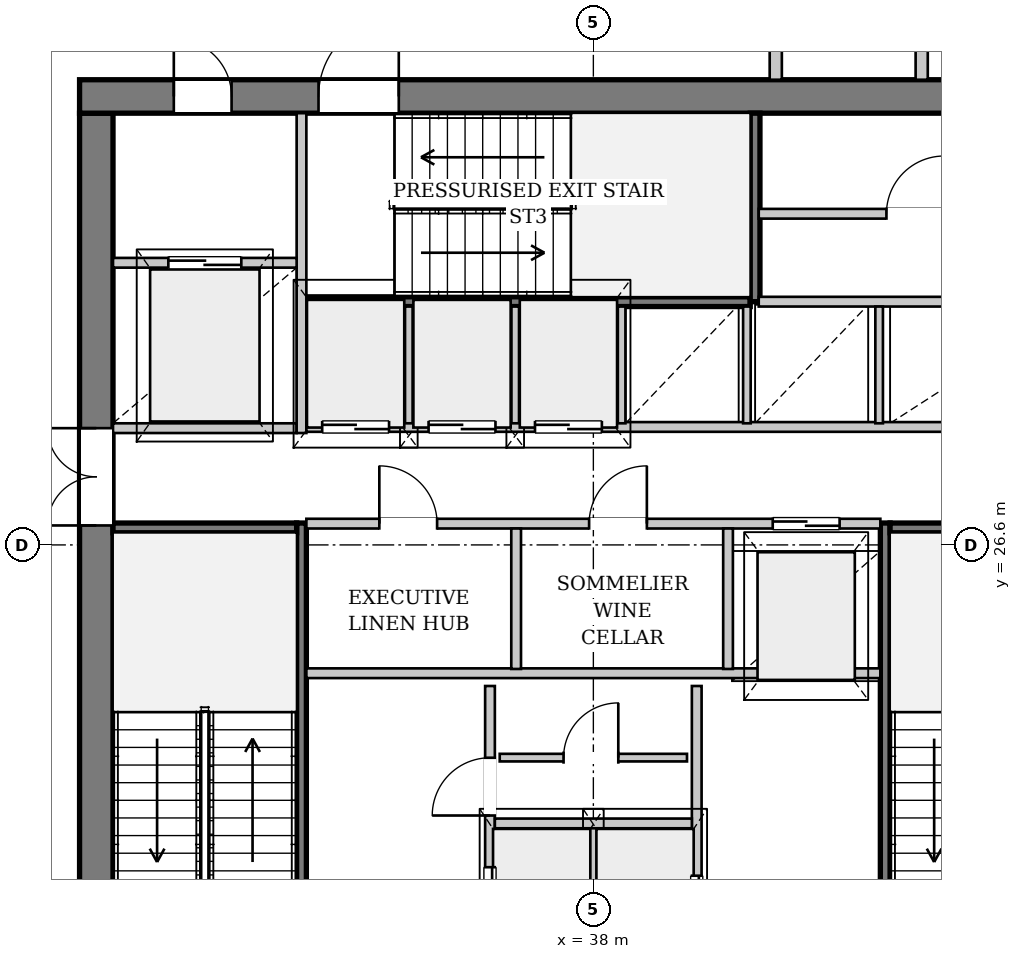
"""IFC4 building model, lengths in metres.
Left out: names, types, materials, properties, quantities, classifications, styles, units other than length and angle.
Written with IfcOpenShell. Run it as: python <this file> out.ifc"""

import sys

from ifc_helpers import new_model, si_unit, direction, frame, frame_2d, origin, place, context, subcontext, project, spatial, rectangle, extrude, source, transform, mapped, element, fill, save


model = new_model("IFC4")
c1 = context("Model", 3, precision=1e-05, world=origin(), true_north=direction((0.0, 1.0)))
c2 = subcontext(c1, "Body", "Model", "MODEL_VIEW")
j1 = project(units=[si_unit("LENGTHUNIT", "METRE"), si_unit("PLANEANGLEUNIT", "RADIAN")], contexts=[c1])
p1 = place(None, origin())
s1 = spatial("IfcSite", under=j1, at=p1, CompositionType="ELEMENT")
p2 = place(p1, origin())
s2 = spatial("IfcBuilding", under=s1, at=p2, CompositionType="ELEMENT")
p3 = place(p2, frame((0.0, 0.0, 146.6)))
s3 = spatial("IfcBuildingStorey", under=s2, at=p3, CompositionType="ELEMENT", Elevation=146.6)
p4 = place(p3, frame((29.825, 19.5, 0.0), z_axis=(0.0, 0.0, 1.0), x_axis=(0.0, 1.0, 0.0)))
e1 = element("IfcWall", 1, at=p4, inside=s3, PredefinedType="SHEAR", context=c2, shape_type="SweptSolid", body=[
    extrude(rectangle(XDim=14.2, YDim=0.55, at=frame_2d((7.1, 0.0))), origin(), (0.0, 0.0, 1.0), 3.3),
])
p5 = place(p4, frame((7.42, 0.0, 0.0)))
e2 = element("IfcOpeningElement", 2, at=p5, cuts=e1, PredefinedType="OPENING", context=c2, shape_type="SweptSolid", body=[
    extrude(rectangle(XDim=1.6, YDim=2.2, at=frame_2d((0.8, 1.1))), frame((0.0, 0.285, 0.0), z_axis=(0.0, -1.0, 0.0), x_axis=(1.0, 0.0, 0.0)), (0.0, 0.0, 1.0), 0.57),
])
p6 = place(p3, frame((29.55, 33.975, 0.0), z_axis=(0.0, 0.0, 1.0), x_axis=(1.0, 0.0, 0.0)))
e3 = element("IfcWall", 3, at=p6, inside=s3, PredefinedType="SHEAR", context=c2, shape_type="SweptSolid", body=[
    extrude(rectangle(XDim=16.9, YDim=0.55, at=frame_2d((8.45, 0.0))), origin(), (0.0, 0.0, 1.0), 3.3),
])
p7 = place(p6, frame((1.55, 0.0, 0.0)))
e4 = element("IfcOpeningElement", 4, at=p7, cuts=e3, PredefinedType="OPENING", context=c2, shape_type="SweptSolid", body=[
    extrude(rectangle(XDim=0.95, YDim=2.1, at=frame_2d((0.475, 1.05))), frame((0.0, 0.285, 0.0), z_axis=(0.0, -1.0, 0.0), x_axis=(1.0, 0.0, 0.0)), (0.0, 0.0, 1.0), 0.57),
])
p8 = place(p6, frame((3.93, 0.0, 0.0)))
e5 = element("IfcOpeningElement", 5, at=p8, cuts=e3, PredefinedType="OPENING", context=c2, shape_type="SweptSolid", body=[
    extrude(rectangle(XDim=1.32, YDim=2.2, at=frame_2d((0.66, 1.1))), frame((0.0, 0.285, 0.0), z_axis=(0.0, -1.0, 0.0), x_axis=(1.0, 0.0, 0.0)), (0.0, 0.0, 1.0), 0.57),
])
p9 = place(p3, frame((33.2, 19.5, 0.0), z_axis=(0.0, 0.0, 1.0), x_axis=(0.0, 1.0, 0.0)))
e6 = element("IfcWall", 6, at=p9, inside=s3, PredefinedType="PARTITIONING", context=c2, shape_type="SweptSolid", body=[
    extrude(rectangle(XDim=7.46, YDim=0.16, at=frame_2d((3.73, 0.0))), origin(), (0.0, 0.0, 1.0), 3.3),
])
p10 = place(p9, frame((0.08, 0.0, 0.0)))
e7 = element("IfcOpeningElement", 7, at=p10, cuts=e6, PredefinedType="OPENING", context=c2, shape_type="SweptSolid", body=[
    extrude(rectangle(XDim=1.32, YDim=2.2, at=frame_2d((0.66, 1.1))), frame((0.0, 0.09, 0.0), z_axis=(0.0, -1.0, 0.0), x_axis=(1.0, 0.0, 0.0)), (0.0, 0.0, 1.0), 0.18),
])
p11 = place(p3, frame((30.1, 26.88, 0.0), z_axis=(0.0, 0.0, 1.0), x_axis=(1.0, 0.0, 0.0)))
e8 = element("IfcWall", 8, at=p11, inside=s3, PredefinedType="PARTITIONING", context=c2, shape_type="SweptSolid", body=[
    extrude(rectangle(XDim=3.02, YDim=0.16, at=frame_2d((1.51, 0.0))), origin(), (0.0, 0.0, 1.0), 3.3),
])
p12 = place(p3, frame((42.8, 26.96, 0.0), z_axis=(0.0, 0.0, 1.0), x_axis=(0.0, -1.0, 0.0)))
e9 = element("IfcWall", 9, at=p12, inside=s3, PredefinedType="PARTITIONING", context=c2, shape_type="SweptSolid", body=[
    extrude(rectangle(XDim=7.46, YDim=0.16, at=frame_2d((3.73, 0.0))), origin(), (0.0, 0.0, 1.0), 3.3),
])
p13 = place(p12, frame((6.06, 0.0, 0.0)))
e10 = element("IfcOpeningElement", 10, at=p13, cuts=e9, PredefinedType="OPENING", context=c2, shape_type="SweptSolid", body=[
    extrude(rectangle(XDim=1.32, YDim=2.2, at=frame_2d((0.66, 1.1))), frame((0.0, 0.09, 0.0), z_axis=(0.0, -1.0, 0.0), x_axis=(1.0, 0.0, 0.0)), (0.0, 0.0, 1.0), 0.18),
])
p14 = place(p3, frame((42.88, 26.88, 0.0), z_axis=(0.0, 0.0, 1.0), x_axis=(1.0, 0.0, 0.0)))
e11 = element("IfcWall", 11, at=p14, inside=s3, PredefinedType="PARTITIONING", context=c2, shape_type="SweptSolid", body=[
    extrude(rectangle(XDim=3.02, YDim=0.16, at=frame_2d((1.51, 0.0))), origin(), (0.0, 0.0, 1.0), 3.3),
])
p15 = place(p3, frame((33.28, 30.6, 0.0), z_axis=(0.0, 0.0, 1.0), x_axis=(1.0, 0.0, 0.0)))
e12 = element("IfcWall", 12, at=p15, inside=s3, PredefinedType="PARTITIONING", context=c2, shape_type="SweptSolid", body=[
    extrude(rectangle(XDim=7.3, YDim=0.16, at=frame_2d((3.65, 0.0))), origin(), (0.0, 0.0, 1.0), 3.3),
])
p16 = place(p3, frame((40.66, 30.6, 0.0), z_axis=(0.0, 0.0, 1.0), x_axis=(0.0, 1.0, 0.0)))
e13 = element("IfcWall", 13, at=p16, inside=s3, PredefinedType="PARTITIONING", context=c2, shape_type="SweptSolid", body=[
    extrude(rectangle(XDim=3.1, YDim=0.16, at=frame_2d((1.55, 0.0))), origin(), (0.0, 0.0, 1.0), 3.3),
])
p17 = place(p3, frame((36.3, 19.5, 0.0), z_axis=(0.0, 0.0, 1.0), x_axis=(0.0, 1.0, 0.0)))
e14 = element("IfcWall", 14, at=p17, inside=s3, PredefinedType="PARTITIONING", context=c2, shape_type="SweptSolid", body=[
    extrude(rectangle(XDim=4.78, YDim=0.16, at=frame_2d((2.39, 0.0))), origin(), (0.0, 0.0, 1.0), 3.3),
])
p18 = place(p17, frame((0.6, 0.0, 0.0)))
e15 = element("IfcOpeningElement", 15, at=p18, cuts=e14, PredefinedType="OPENING", context=c2, shape_type="SweptSolid", body=[
    extrude(rectangle(XDim=1.2, YDim=2.2, at=frame_2d((0.6, 1.1))), frame((0.0, 0.09, 0.0), z_axis=(0.0, -1.0, 0.0), x_axis=(1.0, 0.0, 0.0)), (0.0, 0.0, 1.0), 0.18),
])
p19 = place(p17, frame((2.65, 0.0, 0.0)))
e16 = element("IfcOpeningElement", 16, at=p19, cuts=e14, PredefinedType="OPENING", context=c2, shape_type="SweptSolid", body=[
    extrude(rectangle(XDim=0.95, YDim=2.1, at=frame_2d((0.475, 1.05))), frame((0.0, 0.09, 0.0), z_axis=(0.0, -1.0, 0.0), x_axis=(1.0, 0.0, 0.0)), (0.0, 0.0, 1.0), 0.18),
])
p20 = place(p3, frame((39.7, 24.28, 0.0), z_axis=(0.0, 0.0, 1.0), x_axis=(0.0, -1.0, 0.0)))
e17 = element("IfcWall", 17, at=p20, inside=s3, PredefinedType="PARTITIONING", context=c2, shape_type="SweptSolid", body=[
    extrude(rectangle(XDim=4.78, YDim=0.16, at=frame_2d((2.39, 0.0))), origin(), (0.0, 0.0, 1.0), 3.3),
])
p21 = place(p20, frame((3.12, 0.0, 0.0)))
e18 = element("IfcOpeningElement", 18, at=p21, cuts=e17, PredefinedType="OPENING", context=c2, shape_type="SweptSolid", body=[
    extrude(rectangle(XDim=1.2, YDim=2.2, at=frame_2d((0.6, 1.1))), frame((0.0, 0.09, 0.0), z_axis=(0.0, -1.0, 0.0), x_axis=(1.0, 0.0, 0.0)), (0.0, 0.0, 1.0), 0.18),
])
p22 = place(p3, frame((38.0, 19.5, 0.0), z_axis=(0.0, 0.0, 1.0), x_axis=(0.0, 1.0, 0.0)))
e19 = element("IfcWall", 19, at=p22, inside=s3, PredefinedType="PARTITIONING", context=c2, shape_type="SweptSolid", body=[
    extrude(rectangle(XDim=2.46, YDim=0.125, at=frame_2d((1.23, 0.0))), origin(), (0.0, 0.0, 1.0), 3.3),
])
p23 = place(p3, frame((36.38, 22.02, 0.0), z_axis=(0.0, 0.0, 1.0), x_axis=(1.0, 0.0, 0.0)))
e20 = element("IfcWall", 20, at=p23, inside=s3, PredefinedType="PARTITIONING", context=c2, shape_type="SweptSolid", body=[
    extrude(rectangle(XDim=3.24, YDim=0.16, at=frame_2d((1.62, 0.0))), origin(), (0.0, 0.0, 1.0), 3.3),
])
p24 = place(p3, frame((33.28, 24.49, 0.0), z_axis=(0.0, 0.0, 1.0), x_axis=(1.0, 0.0, 0.0)))
e21 = element("IfcWall", 21, at=p24, inside=s3, PredefinedType="PARTITIONING", context=c2, shape_type="SweptSolid", body=[
    extrude(rectangle(XDim=9.44, YDim=0.16, at=frame_2d((4.72, 0.0))), origin(), (0.0, 0.0, 1.0), 3.3),
])
p25 = place(p3, frame((36.46, 23.102, 0.0), z_axis=(0.0, 0.0, 1.0), x_axis=(1.0, 0.0, 0.0)))
e22 = element("IfcWall", 22, at=p25, inside=s3, PredefinedType="PARTITIONING", context=c2, shape_type="SweptSolid", body=[
    extrude(rectangle(XDim=3.08, YDim=0.125, at=frame_2d((1.54, 0.0))), origin(), (0.0, 0.0, 1.0), 3.3),
])
p26 = place(p25, frame((1.05, 0.0, 0.0)))
e23 = element("IfcOpeningElement", 23, at=p26, cuts=e22, PredefinedType="OPENING", context=c2, shape_type="SweptSolid", body=[
    extrude(rectangle(XDim=0.9, YDim=2.1, at=frame_2d((0.45, 1.05))), frame((0.0, 0.073, 0.0), z_axis=(0.0, -1.0, 0.0), x_axis=(1.0, 0.0, 0.0)), (0.0, 0.0, 1.0), 0.145),
])
p27 = place(p3, frame((30.1, 28.52, 0.0), z_axis=(0.0, 0.0, 1.0), x_axis=(1.0, 0.0, 0.0)))
e24 = element("IfcWall", 24, at=p27, inside=s3, PredefinedType="PARTITIONING", context=c2, shape_type="SweptSolid", body=[
    extrude(rectangle(XDim=3.02, YDim=0.16, at=frame_2d((1.51, 0.0))), origin(), (0.0, 0.0, 1.0), 3.3),
])
p28 = place(p3, frame((33.2, 28.44, 0.0), z_axis=(0.0, 0.0, 1.0), x_axis=(0.0, 1.0, 0.0)))
e25 = element("IfcWall", 25, at=p28, inside=s3, PredefinedType="PARTITIONING", context=c2, shape_type="SweptSolid", body=[
    extrude(rectangle(XDim=5.26, YDim=0.16, at=frame_2d((2.63, 0.0))), origin(), (0.0, 0.0, 1.0), 3.3),
])
p29 = place(p3, frame((30.1, 31.24, 0.0), z_axis=(0.0, 0.0, 1.0), x_axis=(1.0, 0.0, 0.0)))
e26 = element("IfcWall", 26, at=p29, inside=s3, PredefinedType="PARTITIONING", context=c2, shape_type="SweptSolid", body=[
    extrude(rectangle(XDim=3.02, YDim=0.16, at=frame_2d((1.51, 0.0))), origin(), (0.0, 0.0, 1.0), 3.3),
])
p30 = place(p29, frame((0.91, 0.0, 0.0)))
e27 = element("IfcOpeningElement", 27, at=p30, cuts=e26, PredefinedType="OPENING", context=c2, shape_type="SweptSolid", body=[
    extrude(rectangle(XDim=1.2, YDim=2.2, at=frame_2d((0.6, 1.1))), frame((0.0, 0.09, 0.0), z_axis=(0.0, -1.0, 0.0), x_axis=(1.0, 0.0, 0.0)), (0.0, 0.0, 1.0), 0.18),
])
p31 = place(p3, frame((33.28, 26.95, 0.0), z_axis=(0.0, 0.0, 1.0), x_axis=(1.0, 0.0, 0.0)))
e28 = element("IfcWall", 28, at=p31, inside=s3, PredefinedType="PARTITIONING", context=c2, shape_type="SweptSolid", body=[
    extrude(rectangle(XDim=9.44, YDim=0.16, at=frame_2d((4.72, 0.0))), origin(), (0.0, 0.0, 1.0), 3.3),
])
p32 = place(p31, frame((1.2, 0.0, 0.0)))
e29 = element("IfcOpeningElement", 29, at=p32, cuts=e28, PredefinedType="OPENING", context=c2, shape_type="SweptSolid", body=[
    extrude(rectangle(XDim=0.95, YDim=2.1, at=frame_2d((0.475, 1.05))), frame((0.0, 0.09, 0.0), z_axis=(0.0, -1.0, 0.0), x_axis=(1.0, 0.0, 0.0)), (0.0, 0.0, 1.0), 0.18),
])
p33 = place(p31, frame((4.65, 0.0, 0.0)))
e30 = element("IfcOpeningElement", 30, at=p33, cuts=e28, PredefinedType="OPENING", context=c2, shape_type="SweptSolid", body=[
    extrude(rectangle(XDim=0.95, YDim=2.1, at=frame_2d((0.475, 1.05))), frame((0.0, 0.09, 0.0), z_axis=(0.0, -1.0, 0.0), x_axis=(1.0, 0.0, 0.0)), (0.0, 0.0, 1.0), 0.18),
])
p34 = place(p31, frame((7.67, 0.0, 0.0)))
e31 = element("IfcOpeningElement", 31, at=p34, cuts=e28, PredefinedType="OPENING", context=c2, shape_type="SweptSolid", body=[
    extrude(rectangle(XDim=1.1, YDim=2.2, at=frame_2d((0.55, 1.1))), frame((0.0, 0.09, 0.0), z_axis=(0.0, -1.0, 0.0), x_axis=(1.0, 0.0, 0.0)), (0.0, 0.0, 1.0), 0.18),
])
for number, where, z_axis, x_axis in (
    (32, (36.73, 24.56, 0.0), (0.0, 0.0, 1.0), (0.0, 1.0, 0.0)),
    (33, (40.215, 24.56, 0.0), (0.0, 0.0, 1.0), (0.0, 1.0, 0.0)),
):
    element("IfcWall", number, at=place(p3, frame(where, z_axis=z_axis, x_axis=x_axis)), inside=s3, PredefinedType="PARTITIONING", context=c2, shape_type="SweptSolid", body=[
        extrude(rectangle(XDim=2.31, YDim=0.16, at=frame_2d((1.155, 0.0))), origin(), (0.0, 0.0, 1.0), 3.3),
    ])
p35 = place(p3, frame((33.28, 28.54, 0.0), z_axis=(0.0, 0.0, 1.0), x_axis=(1.0, 0.0, 0.0)))
e34 = element("IfcWall", 34, at=p35, inside=s3, PredefinedType="PARTITIONING", context=c2, shape_type="SweptSolid", body=[
    extrude(rectangle(XDim=12.62, YDim=0.16, at=frame_2d((6.31, 0.0))), origin(), (0.0, 0.0, 1.0), 3.3),
])
p36 = place(p35, frame((0.26, 0.0, 0.0)))
e35 = element("IfcOpeningElement", 35, at=p36, cuts=e34, PredefinedType="OPENING", context=c2, shape_type="SweptSolid", body=[
    extrude(rectangle(XDim=1.1, YDim=2.2, at=frame_2d((0.55, 1.1))), frame((0.0, 0.09, 0.0), z_axis=(0.0, -1.0, 0.0), x_axis=(1.0, 0.0, 0.0)), (0.0, 0.0, 1.0), 0.18),
])
p37 = place(p35, frame((2.01, 0.0, 0.0)))
e36 = element("IfcOpeningElement", 36, at=p37, cuts=e34, PredefinedType="OPENING", context=c2, shape_type="SweptSolid", body=[
    extrude(rectangle(XDim=1.1, YDim=2.2, at=frame_2d((0.55, 1.1))), frame((0.0, 0.09, 0.0), z_axis=(0.0, -1.0, 0.0), x_axis=(1.0, 0.0, 0.0)), (0.0, 0.0, 1.0), 0.18),
])
p38 = place(p35, frame((3.76, 0.0, 0.0)))
e37 = element("IfcOpeningElement", 37, at=p38, cuts=e34, PredefinedType="OPENING", context=c2, shape_type="SweptSolid", body=[
    extrude(rectangle(XDim=1.1, YDim=2.2, at=frame_2d((0.55, 1.1))), frame((0.0, 0.09, 0.0), z_axis=(0.0, -1.0, 0.0), x_axis=(1.0, 0.0, 0.0)), (0.0, 0.0, 1.0), 0.18),
])
p39 = place(p3, frame((40.72, 30.6, 0.0), z_axis=(0.0, 0.0, 1.0), x_axis=(1.0, 0.0, 0.0)))
e38 = element("IfcWall", 38, at=p39, inside=s3, PredefinedType="PARTITIONING", context=c2, shape_type="SweptSolid", body=[
    extrude(rectangle(XDim=5.18, YDim=0.16, at=frame_2d((2.59, 0.0))), origin(), (0.0, 0.0, 1.0), 3.3),
])
for number, where, z_axis, x_axis in (
    (39, (34.965, 28.6, 0.0), (0.0, 0.0, 1.0), (0.0, 1.0, 0.0)),
    (40, (36.715, 28.6, 0.0), (0.0, 0.0, 1.0), (0.0, 1.0, 0.0)),
    (41, (38.465, 28.6, 0.0), (0.0, 0.0, 1.0), (0.0, 1.0, 0.0)),
    (42, (40.525, 28.6, 0.0), (0.0, 0.0, 1.0), (0.0, 1.0, 0.0)),
    (43, (42.7, 28.6, 0.0), (0.0, 0.0, 1.0), (0.0, 1.0, 0.0)),
):
    element("IfcWall", number, at=place(p3, frame(where, z_axis=z_axis, x_axis=x_axis)), inside=s3, PredefinedType="PARTITIONING", context=c2, shape_type="SweptSolid", body=[
        extrude(rectangle(XDim=1.92, YDim=0.125, at=frame_2d((0.96, 0.0))), origin(), (0.0, 0.0, 1.0), 3.3),
    ])
p40 = place(p3, frame((40.72, 32.046, 0.0), z_axis=(0.0, 0.0, 1.0), x_axis=(1.0, 0.0, 0.0)))
e44 = element("IfcWall", 44, at=p40, inside=s3, PredefinedType="PARTITIONING", context=c2, shape_type="SweptSolid", body=[
    extrude(rectangle(XDim=5.03, YDim=0.16, at=frame_2d((2.515, 0.0))), origin(), (0.0, 0.0, 1.0), 3.3),
])
p41 = place(p40, frame((2.1, 0.0, 0.0)))
e45 = element("IfcOpeningElement", 45, at=p41, cuts=e44, PredefinedType="OPENING", context=c2, shape_type="SweptSolid", body=[
    extrude(rectangle(XDim=0.95, YDim=2.1, at=frame_2d((0.475, 1.05))), frame((0.0, 0.09, 0.0), z_axis=(0.0, -1.0, 0.0), x_axis=(1.0, 0.0, 0.0)), (0.0, 0.0, 1.0), 0.18),
])
for number, where, z_axis, x_axis in (
    (46, (41.0, 34.25, 0.0), (0.0, 0.0, 1.0), (0.0, 1.0, 0.0)),
    (47, (43.4, 34.25, 0.0), (0.0, 0.0, 1.0), (0.0, 1.0, 0.0)),
):
    element("IfcWall", number, at=place(p3, frame(where, z_axis=z_axis, x_axis=x_axis)), inside=s3, PredefinedType="PARTITIONING", context=c2, shape_type="SweptSolid", body=[
        extrude(rectangle(XDim=1.95, YDim=0.2, at=frame_2d((0.975, 0.0))), origin(), (0.0, 0.0, 1.0), 3.3),
    ])
m1 = source(origin(), c2, "Body", "SweptSolid", [
    extrude(rectangle(XDim=1.6, YDim=2.2, at=frame_2d((0.8, 1.1))), frame((0.0, 0.025, 0.0), z_axis=(0.0, -1.0, 0.0), x_axis=(1.0, 0.0, 0.0)), (0.0, 0.0, 1.0), 0.05),
])
p42 = place(p5, origin())
e48 = element("IfcDoor", 48, at=p42, inside=s3, OperationType="DOUBLE_DOOR_SINGLE_SWING", PredefinedType="DOOR", context=c2, shape_type="MappedRepresentation", body=[
    mapped(m1, transform((0.0, 0.0, 0.0), x_axis=(1.0, 0.0, 0.0), y_axis=(0.0, 1.0, 0.0), z_axis=(0.0, 0.0, 1.0), scale=1.0)),
])
fill(e2, e48)
m2 = source(origin(), c2, "Body", "SweptSolid", [
    extrude(rectangle(XDim=0.95, YDim=2.1, at=frame_2d((0.475, 1.05))), frame((0.0, 0.025, 0.0), z_axis=(0.0, -1.0, 0.0), x_axis=(1.0, 0.0, 0.0)), (0.0, 0.0, 1.0), 0.05),
])
p43 = place(p7, origin())
e49 = element("IfcDoor", 49, at=p43, inside=s3, OperationType="SINGLE_SWING_LEFT", PredefinedType="DOOR", context=c2, shape_type="MappedRepresentation", body=[
    mapped(m2, transform((0.0, 0.0, 0.0), x_axis=(1.0, 0.0, 0.0), y_axis=(0.0, 1.0, 0.0), z_axis=(0.0, 0.0, 1.0), scale=1.0)),
])
fill(e4, e49)
m3 = source(origin(), c2, "Body", "SweptSolid", [
    extrude(rectangle(XDim=1.32, YDim=2.2, at=frame_2d((0.66, 1.1))), frame((0.0, 0.025, 0.0), z_axis=(0.0, -1.0, 0.0), x_axis=(1.0, 0.0, 0.0)), (0.0, 0.0, 1.0), 0.05),
])
p44 = place(p8, origin())
e50 = element("IfcDoor", 50, at=p44, inside=s3, OperationType="SINGLE_SWING_RIGHT", PredefinedType="DOOR", context=c2, shape_type="MappedRepresentation", body=[
    mapped(m3, transform((0.0, 0.0, 0.0), x_axis=(1.0, 0.0, 0.0), y_axis=(0.0, 1.0, 0.0), z_axis=(0.0, 0.0, 1.0), scale=1.0)),
])
fill(e5, e50)
m4 = source(origin(), c2, "Body", "SweptSolid", [
    extrude(rectangle(XDim=1.2, YDim=2.2, at=frame_2d((0.6, 1.1))), frame((0.0, 0.025, 0.0), z_axis=(0.0, -1.0, 0.0), x_axis=(1.0, 0.0, 0.0)), (0.0, 0.0, 1.0), 0.05),
])
p45 = place(p18, origin())
e51 = element("IfcDoor", 51, at=p45, inside=s3, OperationType="DOUBLE_DOOR_SLIDING", PredefinedType="DOOR", context=c2, shape_type="MappedRepresentation", body=[
    mapped(m4, transform((0.0, 0.0, 0.0), x_axis=(1.0, 0.0, 0.0), y_axis=(0.0, 1.0, 0.0), z_axis=(0.0, 0.0, 1.0), scale=1.0)),
])
fill(e15, e51)
p46 = place(p19, origin())
e52 = element("IfcDoor", 52, at=p46, inside=s3, OperationType="SINGLE_SWING_LEFT", PredefinedType="DOOR", context=c2, shape_type="MappedRepresentation", body=[
    mapped(m2, transform((0.0, 0.0, 0.0), x_axis=(1.0, 0.0, 0.0), y_axis=(0.0, 1.0, 0.0), z_axis=(0.0, 0.0, 1.0), scale=1.0)),
])
fill(e16, e52)
m5 = source(origin(), c2, "Body", "SweptSolid", [
    extrude(rectangle(XDim=0.9, YDim=2.1, at=frame_2d((0.45, 1.05))), frame((0.0, 0.025, 0.0), z_axis=(0.0, -1.0, 0.0), x_axis=(1.0, 0.0, 0.0)), (0.0, 0.0, 1.0), 0.05),
])
p47 = place(p26, origin())
e53 = element("IfcDoor", 53, at=p47, inside=s3, OperationType="SINGLE_SWING_RIGHT", PredefinedType="DOOR", context=c2, shape_type="MappedRepresentation", body=[
    mapped(m5, transform((0.0, 0.0, 0.0), x_axis=(1.0, 0.0, 0.0), y_axis=(0.0, 1.0, 0.0), z_axis=(0.0, 0.0, 1.0), scale=1.0)),
])
fill(e23, e53)
p48 = place(p21, origin())
e54 = element("IfcDoor", 54, at=p48, inside=s3, OperationType="DOUBLE_DOOR_SLIDING", PredefinedType="DOOR", context=c2, shape_type="MappedRepresentation", body=[
    mapped(m4, transform((0.0, 0.0, 0.0), x_axis=(1.0, 0.0, 0.0), y_axis=(0.0, 1.0, 0.0), z_axis=(0.0, 0.0, 1.0), scale=1.0)),
])
fill(e18, e54)
p49 = place(p30, origin())
e55 = element("IfcDoor", 55, at=p49, inside=s3, OperationType="DOUBLE_DOOR_SLIDING", PredefinedType="DOOR", context=c2, shape_type="MappedRepresentation", body=[
    mapped(m4, transform((0.0, 0.0, 0.0), x_axis=(1.0, 0.0, 0.0), y_axis=(0.0, 1.0, 0.0), z_axis=(0.0, 0.0, 1.0), scale=1.0)),
])
fill(e27, e55)
p50 = place(p32, origin())
e56 = element("IfcDoor", 56, at=p50, inside=s3, OperationType="SINGLE_SWING_LEFT", PredefinedType="DOOR", context=c2, shape_type="MappedRepresentation", body=[
    mapped(m2, transform((0.0, 0.0, 0.0), x_axis=(1.0, 0.0, 0.0), y_axis=(0.0, 1.0, 0.0), z_axis=(0.0, 0.0, 1.0), scale=1.0)),
])
fill(e29, e56)
p51 = place(p33, origin())
e57 = element("IfcDoor", 57, at=p51, inside=s3, OperationType="SINGLE_SWING_RIGHT", PredefinedType="DOOR", context=c2, shape_type="MappedRepresentation", body=[
    mapped(m2, transform((0.0, 0.0, 0.0), x_axis=(1.0, 0.0, 0.0), y_axis=(0.0, 1.0, 0.0), z_axis=(0.0, 0.0, 1.0), scale=1.0)),
])
fill(e30, e57)
m6 = source(origin(), c2, "Body", "SweptSolid", [
    extrude(rectangle(XDim=1.1, YDim=2.2, at=frame_2d((0.55, 1.1))), frame((0.0, 0.025, 0.0), z_axis=(0.0, -1.0, 0.0), x_axis=(1.0, 0.0, 0.0)), (0.0, 0.0, 1.0), 0.05),
])
p52 = place(p34, origin())
e58 = element("IfcDoor", 58, at=p52, inside=s3, OperationType="DOUBLE_DOOR_SLIDING", PredefinedType="DOOR", context=c2, shape_type="MappedRepresentation", body=[
    mapped(m6, transform((0.0, 0.0, 0.0), x_axis=(1.0, 0.0, 0.0), y_axis=(0.0, 1.0, 0.0), z_axis=(0.0, 0.0, 1.0), scale=1.0)),
])
fill(e31, e58)
p53 = place(p36, origin())
e59 = element("IfcDoor", 59, at=p53, inside=s3, OperationType="DOUBLE_DOOR_SLIDING", PredefinedType="DOOR", context=c2, shape_type="MappedRepresentation", body=[
    mapped(m6, transform((0.0, 0.0, 0.0), x_axis=(1.0, 0.0, 0.0), y_axis=(0.0, 1.0, 0.0), z_axis=(0.0, 0.0, 1.0), scale=1.0)),
])
fill(e35, e59)
p54 = place(p37, origin())
e60 = element("IfcDoor", 60, at=p54, inside=s3, OperationType="DOUBLE_DOOR_SLIDING", PredefinedType="DOOR", context=c2, shape_type="MappedRepresentation", body=[
    mapped(m6, transform((0.0, 0.0, 0.0), x_axis=(1.0, 0.0, 0.0), y_axis=(0.0, 1.0, 0.0), z_axis=(0.0, 0.0, 1.0), scale=1.0)),
])
fill(e36, e60)
p55 = place(p38, origin())
e61 = element("IfcDoor", 61, at=p55, inside=s3, OperationType="DOUBLE_DOOR_SLIDING", PredefinedType="DOOR", context=c2, shape_type="MappedRepresentation", body=[
    mapped(m6, transform((0.0, 0.0, 0.0), x_axis=(1.0, 0.0, 0.0), y_axis=(0.0, 1.0, 0.0), z_axis=(0.0, 0.0, 1.0), scale=1.0)),
])
fill(e37, e61)
p56 = place(p41, origin())
e62 = element("IfcDoor", 62, at=p56, inside=s3, OperationType="SINGLE_SWING_RIGHT", PredefinedType="DOOR", context=c2, shape_type="MappedRepresentation", body=[
    mapped(m2, transform((0.0, 0.0, 0.0), x_axis=(1.0, 0.0, 0.0), y_axis=(0.0, 1.0, 0.0), z_axis=(0.0, 0.0, 1.0), scale=1.0)),
])
fill(e45, e62)
save(model, sys.argv[1])
